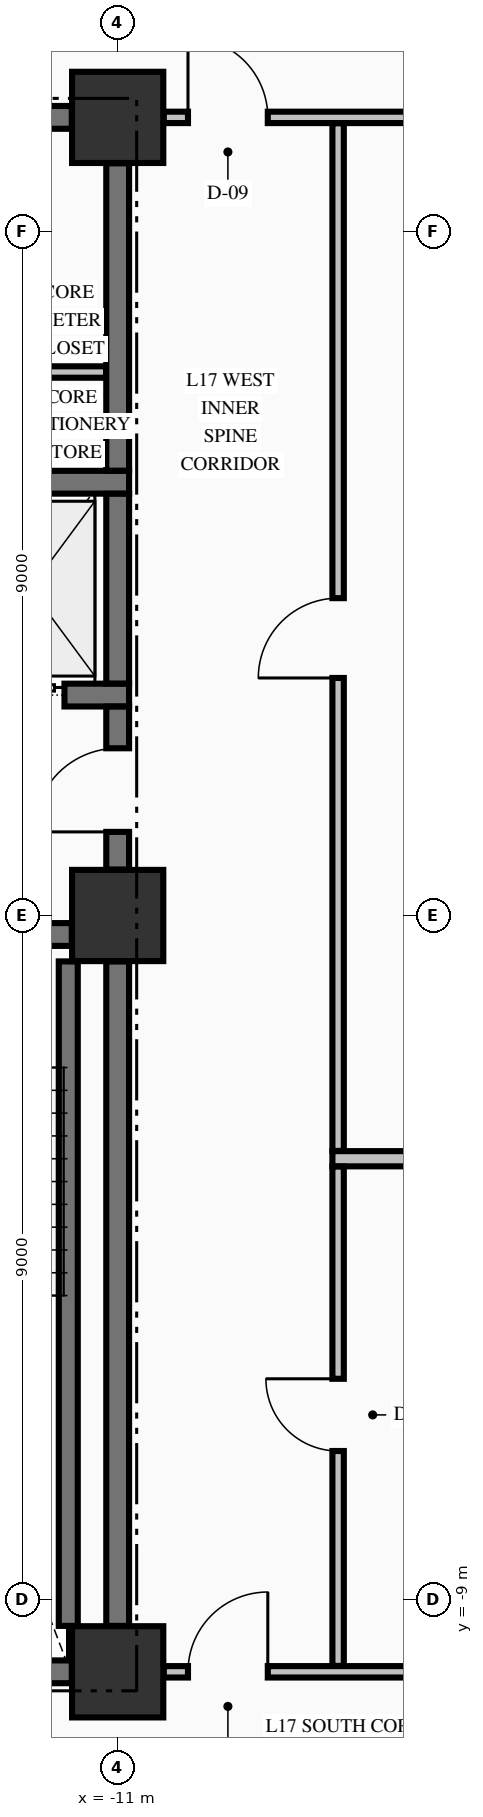
"""IFC4 building model, lengths in metres.
Left out: names, types, materials, properties, quantities, classifications, styles, units other than length and angle.
Written with IfcOpenShell. Run it as: python <this file> out.ifc"""

import sys

from ifc_helpers import new_model, si_unit, direction, frame, frame_2d, origin, origin_2d, place, context, subcontext, project, spatial, rectangle, extrude, element, fill, save


model = new_model("IFC4")
c1 = context("Model", 3, precision=1e-05, world=origin(), true_north=direction((0.0, 1.0)))
c2 = subcontext(c1, "Body", "Model", "MODEL_VIEW")
j1 = project(units=[si_unit("LENGTHUNIT", "METRE"), si_unit("PLANEANGLEUNIT", "RADIAN")], contexts=[c1])
p1 = place(None, origin())
s1 = spatial("IfcSite", under=j1, at=p1, CompositionType="ELEMENT")
p2 = place(p1, origin())
s2 = spatial("IfcBuilding", under=s1, at=p2, CompositionType="ELEMENT")
p3 = place(p2, frame((0.0, 0.0, 71.47)))
s3 = spatial("IfcBuildingStorey", under=s2, at=p3, CompositionType="ELEMENT", Elevation=71.47)
for number, where, z_axis, x_axis in (
    (1, (-11.0, -9.95, -0.325), (0.0, 0.0, 1.0), (1.0, 0.0, 0.0)),
    (2, (-11.0, 0.0, -0.325), (0.0, 0.0, 1.0), (1.0, 0.0, 0.0)),
    (3, (-11.0, 10.5, -0.325), (0.0, 0.0, 1.0), (1.0, 0.0, 0.0)),
):
    element("IfcColumn", number, at=place(p3, frame(where, z_axis=z_axis, x_axis=x_axis)), inside=s3, PredefinedType="COLUMN", context=c2, shape_type="SweptSolid", body=[
        extrude(rectangle(XDim=1.2, YDim=1.2, at=origin_2d()), origin(), (0.0, 0.0, 1.0), 3.645),
    ])
p4 = place(p3, frame((-14.7, -9.95, 0.0), z_axis=(0.0, 0.0, 1.0), x_axis=(1.0, 0.0, 0.0)))
e4 = element("IfcWall", 4, at=p4, inside=s3, PredefinedType="SHEAR", context=c2, shape_type="SweptSolid", body=[
    extrude(rectangle(XDim=3.096, YDim=0.3, at=frame_2d((1.548, 0.0))), origin(), (0.0, 0.0, 1.0), 3.32),
])
p5 = place(p3, frame((-19.396, -0.25, 0.0), z_axis=(0.0, 0.0, 1.0), x_axis=(1.0, 0.0, 0.0)))
e5 = element("IfcWall", 5, at=p5, inside=s3, PredefinedType="SHEAR", context=c2, shape_type="SweptSolid", body=[
    extrude(rectangle(XDim=7.792, YDim=0.3, at=frame_2d((3.896, 0.0))), origin(), (0.0, 0.0, 1.0), 3.32),
])
p6 = place(p5, frame((5.696, 0.0, 0.0)))
e6 = element("IfcOpeningElement", 6, at=p6, cuts=e5, PredefinedType="OPENING", context=c2, shape_type="SweptSolid", body=[
    extrude(rectangle(XDim=1.1, YDim=2.15, at=frame_2d((0.55, 1.075))), frame((0.0, 0.16, 0.0), z_axis=(0.0, -1.0, 0.0), x_axis=(1.0, 0.0, 0.0)), (0.0, 0.0, 1.0), 0.32),
])
p7 = place(p3, frame((-14.875, 2.9, 0.0), z_axis=(0.0, 0.0, 1.0), x_axis=(1.0, 0.0, 0.0)))
e7 = element("IfcWall", 7, at=p7, inside=s3, PredefinedType="SHEAR", context=c2, shape_type="SweptSolid", body=[
    extrude(rectangle(XDim=4.025, YDim=0.3, at=frame_2d((2.012, 0.0))), origin(), (0.0, 0.0, 1.0), 3.32),
])
p8 = place(p7, frame((2.075, 0.0, 0.0)))
e8 = element("IfcOpeningElement", 8, at=p8, cuts=e7, PredefinedType="OPENING", context=c2, shape_type="SweptSolid", body=[
    extrude(rectangle(XDim=1.1, YDim=2.2, at=frame_2d((0.55, 1.1))), frame((0.0, 0.16, 0.0), z_axis=(0.0, -1.0, 0.0), x_axis=(1.0, 0.0, 0.0)), (0.0, 0.0, 1.0), 0.32),
])
p9 = place(p3, frame((-14.875, 5.7, 0.0), z_axis=(0.0, 0.0, 1.0), x_axis=(1.0, 0.0, 0.0)))
e9 = element("IfcWall", 9, at=p9, inside=s3, PredefinedType="SHEAR", context=c2, shape_type="SweptSolid", body=[
    extrude(rectangle(XDim=4.025, YDim=0.3, at=frame_2d((2.012, 0.0))), origin(), (0.0, 0.0, 1.0), 3.32),
])
p10 = place(p3, frame((-14.7, 10.5, 0.0), z_axis=(0.0, 0.0, 1.0), x_axis=(1.0, 0.0, 0.0)))
e10 = element("IfcWall", 10, at=p10, inside=s3, PredefinedType="SHEAR", context=c2, shape_type="SweptSolid", body=[
    extrude(rectangle(XDim=3.096, YDim=0.3, at=frame_2d((1.548, 0.0))), origin(), (0.0, 0.0, 1.0), 3.32),
])
p11 = place(p10, frame((0.305, 0.0, 0.0)))
e11 = element("IfcOpeningElement", 11, at=p11, cuts=e10, PredefinedType="OPENING", context=c2, shape_type="SweptSolid", body=[
    extrude(rectangle(XDim=0.95, YDim=2.15, at=frame_2d((0.475, 1.075))), frame((0.0, 0.16, 0.0), z_axis=(0.0, -1.0, 0.0), x_axis=(1.0, 0.0, 0.0)), (0.0, 0.0, 1.0), 0.32),
])
p12 = place(p3, frame((-10.394, -9.95, 0.0), z_axis=(0.0, 0.0, 1.0), x_axis=(1.0, 0.0, 0.0)))
e12 = element("IfcWall", 12, at=p12, inside=s3, PredefinedType="PARTITIONING", context=c2, shape_type="SweptSolid", body=[
    extrude(rectangle(XDim=20.788, YDim=0.15, at=frame_2d((10.394, 0.0))), origin(), (0.0, 0.0, 1.0), 3.32),
])
p13 = place(p12, frame((0.319, 0.0, 0.0)))
e13 = element("IfcOpeningElement", 13, at=p13, cuts=e12, PredefinedType="OPENING", context=c2, shape_type="SweptSolid", body=[
    extrude(rectangle(XDim=1.05, YDim=2.15, at=frame_2d((0.525, 1.075))), frame((0.0, 0.085, 0.0), z_axis=(0.0, -1.0, 0.0), x_axis=(1.0, 0.0, 0.0)), (0.0, 0.0, 1.0), 0.17),
])
p14 = place(p12, frame((19.419, 0.0, 0.0)))
e14 = element("IfcOpeningElement", 14, at=p14, cuts=e12, PredefinedType="OPENING", context=c2, shape_type="SweptSolid", body=[
    extrude(rectangle(XDim=1.05, YDim=2.15, at=frame_2d((0.525, 1.075))), frame((0.0, 0.085, 0.0), z_axis=(0.0, -1.0, 0.0), x_axis=(1.0, 0.0, 0.0)), (0.0, 0.0, 1.0), 0.17),
])
p15 = place(p12, frame((11.569, 0.0, 0.0)))
e15 = element("IfcOpeningElement", 15, at=p15, cuts=e12, PredefinedType="OPENING", context=c2, shape_type="SweptSolid", body=[
    extrude(rectangle(XDim=0.95, YDim=2.15, at=frame_2d((0.475, 1.075))), frame((0.0, 0.085, 0.0), z_axis=(0.0, -1.0, 0.0), x_axis=(1.0, 0.0, 0.0)), (0.0, 0.0, 1.0), 0.17),
])
p16 = place(p3, frame((-8.175, -3.2, 0.0), z_axis=(0.0, 0.0, 1.0), x_axis=(1.0, 0.0, 0.0)))
e16 = element("IfcWall", 16, at=p16, inside=s3, PredefinedType="PARTITIONING", context=c2, shape_type="SweptSolid", body=[
    extrude(rectangle(XDim=6.475, YDim=0.2, at=frame_2d((3.238, 0.0))), origin(), (0.0, 0.0, 1.0), 3.32),
])
p17 = place(p3, frame((-13.225, 7.15, 0.0), z_axis=(0.0, 0.0, 1.0), x_axis=(1.0, 0.0, 0.0)))
e17 = element("IfcWall", 17, at=p17, inside=s3, PredefinedType="PARTITIONING", context=c2, shape_type="SweptSolid", body=[
    extrude(rectangle(XDim=2.072, YDim=0.15, at=frame_2d((1.036, 0.0))), origin(), (0.0, 0.0, 1.0), 3.32),
])
p18 = place(p3, frame((-10.394, 10.5, 0.0), z_axis=(0.0, 0.0, 1.0), x_axis=(1.0, 0.0, 0.0)))
e18 = element("IfcWall", 18, at=p18, inside=s3, PredefinedType="PARTITIONING", context=c2, shape_type="SweptSolid", body=[
    extrude(rectangle(XDim=20.788, YDim=0.15, at=frame_2d((10.394, 0.0))), origin(), (0.0, 0.0, 1.0), 3.32),
])
p19 = place(p18, frame((0.319, 0.0, 0.0)))
e19 = element("IfcOpeningElement", 19, at=p19, cuts=e18, PredefinedType="OPENING", context=c2, shape_type="SweptSolid", body=[
    extrude(rectangle(XDim=1.05, YDim=2.15, at=frame_2d((0.525, 1.075))), frame((0.0, 0.085, 0.0), z_axis=(0.0, -1.0, 0.0), x_axis=(1.0, 0.0, 0.0)), (0.0, 0.0, 1.0), 0.17),
])
p20 = place(p18, frame((19.419, 0.0, 0.0)))
e20 = element("IfcOpeningElement", 20, at=p20, cuts=e18, PredefinedType="OPENING", context=c2, shape_type="SweptSolid", body=[
    extrude(rectangle(XDim=1.05, YDim=2.15, at=frame_2d((0.525, 1.075))), frame((0.0, 0.085, 0.0), z_axis=(0.0, -1.0, 0.0), x_axis=(1.0, 0.0, 0.0)), (0.0, 0.0, 1.0), 0.17),
])
p21 = place(p3, frame((-11.65, -9.346, 0.0), z_axis=(0.0, 0.0, 1.0), x_axis=(0.0, 1.0, 0.0)))
e21 = element("IfcWall", 21, at=p21, inside=s3, PredefinedType="SOLIDWALL", context=c2, shape_type="SweptSolid", body=[
    extrude(rectangle(XDim=8.742, YDim=0.25, at=frame_2d((4.371, 0.0))), origin(), (0.0, 0.0, 1.0), 3.32),
])
p22 = place(p3, frame((-11.0, -9.346, 0.0), z_axis=(0.0, 0.0, 1.0), x_axis=(0.0, 1.0, 0.0)))
e22 = element("IfcWall", 22, at=p22, inside=s3, PredefinedType="SHEAR", context=c2, shape_type="SweptSolid", body=[
    extrude(rectangle(XDim=8.742, YDim=0.3, at=frame_2d((4.371, 0.0))), origin(), (0.0, 0.0, 1.0), 3.32),
])
p23 = place(p3, frame((-11.0, 0.604, 0.0), z_axis=(0.0, 0.0, 1.0), x_axis=(0.0, 1.0, 0.0)))
e23 = element("IfcWall", 23, at=p23, inside=s3, PredefinedType="SHEAR", context=c2, shape_type="SweptSolid", body=[
    extrude(rectangle(XDim=2.144, YDim=0.3, at=frame_2d((1.072, 0.0))), origin(), (0.0, 0.0, 1.0), 3.32),
])
p24 = place(p23, frame((0.496, 0.0, 0.0)))
e24 = element("IfcOpeningElement", 24, at=p24, cuts=e23, PredefinedType="OPENING", context=c2, shape_type="SweptSolid", body=[
    extrude(rectangle(XDim=1.1, YDim=2.15, at=frame_2d((0.55, 1.075))), frame((0.0, 0.16, 0.0), z_axis=(0.0, -1.0, 0.0), x_axis=(1.0, 0.0, 0.0)), (0.0, 0.0, 1.0), 0.32),
])
p25 = place(p3, frame((-11.0, 3.052, 0.0), z_axis=(0.0, 0.0, 1.0), x_axis=(0.0, 1.0, 0.0)))
e25 = element("IfcWall", 25, at=p25, inside=s3, PredefinedType="SHEAR", context=c2, shape_type="SweptSolid", body=[
    extrude(rectangle(XDim=2.496, YDim=0.3, at=frame_2d((1.248, 0.0))), origin(), (0.0, 0.0, 1.0), 3.32),
])
p26 = place(p3, frame((-11.0, 5.852, 0.0), z_axis=(0.0, 0.0, 1.0), x_axis=(0.0, 1.0, 0.0)))
e26 = element("IfcWall", 26, at=p26, inside=s3, PredefinedType="SHEAR", context=c2, shape_type="SweptSolid", body=[
    extrude(rectangle(XDim=4.044, YDim=0.3, at=frame_2d((2.022, 0.0))), origin(), (0.0, 0.0, 1.0), 3.32),
])
p27 = place(p3, frame((-8.1, -9.872, 0.0), z_axis=(0.0, 0.0, 1.0), x_axis=(0.0, 1.0, 0.0)))
e27 = element("IfcWall", 27, at=p27, inside=s3, PredefinedType="PARTITIONING", context=c2, shape_type="SweptSolid", body=[
    extrude(rectangle(XDim=6.569, YDim=0.15, at=frame_2d((3.285, 0.0))), origin(), (0.0, 0.0, 1.0), 3.32),
])
p28 = place(p27, frame((2.827, 0.0, 0.0)))
e28 = element("IfcOpeningElement", 28, at=p28, cuts=e27, PredefinedType="OPENING", context=c2, shape_type="SweptSolid", body=[
    extrude(rectangle(XDim=0.95, YDim=2.15, at=frame_2d((0.475, 1.075))), frame((0.0, 0.085, 0.0), z_axis=(0.0, -1.0, 0.0), x_axis=(1.0, 0.0, 0.0)), (0.0, 0.0, 1.0), 0.17),
])
p29 = place(p3, frame((-8.1, -3.097, 0.0), z_axis=(0.0, 0.0, 1.0), x_axis=(0.0, 1.0, 0.0)))
e29 = element("IfcWall", 29, at=p29, inside=s3, PredefinedType="PARTITIONING", context=c2, shape_type="SweptSolid", body=[
    extrude(rectangle(XDim=13.519, YDim=0.15, at=frame_2d((6.76, 0.0))), origin(), (0.0, 0.0, 1.0), 3.32),
])
p30 = place(p29, frame((6.222, 0.0, 0.0)))
e30 = element("IfcOpeningElement", 30, at=p30, cuts=e29, PredefinedType="OPENING", context=c2, shape_type="SweptSolid", body=[
    extrude(rectangle(XDim=1.05, YDim=2.15, at=frame_2d((0.525, 1.075))), frame((0.0, 0.085, 0.0), z_axis=(0.0, -1.0, 0.0), x_axis=(1.0, 0.0, 0.0)), (0.0, 0.0, 1.0), 0.17),
])
p31 = place(p24, origin())
e31 = element("IfcDoor", 31, at=p31, inside=s3, OperationType="SINGLE_SWING_LEFT", PredefinedType="DOOR", context=c2, shape_type="SweptSolid", body=[
    extrude(rectangle(XDim=1.1, YDim=2.15, at=frame_2d((0.55, 1.075))), frame((0.0, 0.025, 0.0), z_axis=(0.0, -1.0, 0.0), x_axis=(1.0, 0.0, 0.0)), (0.0, 0.0, 1.0), 0.05),
])
fill(e24, e31)
p32 = place(p8, origin())
e32 = element("IfcDoor", 32, at=p32, inside=s3, OperationType="SLIDING_TO_LEFT", PredefinedType="DOOR", context=c2, shape_type="SweptSolid", body=[
    extrude(rectangle(XDim=1.1, YDim=2.2, at=frame_2d((0.55, 1.1))), frame((0.0, 0.025, 0.0), z_axis=(0.0, -1.0, 0.0), x_axis=(1.0, 0.0, 0.0)), (0.0, 0.0, 1.0), 0.05),
])
fill(e8, e32)
p33 = place(p19, origin())
e33 = element("IfcDoor", 33, at=p33, inside=s3, OperationType="SINGLE_SWING_LEFT", PredefinedType="DOOR", context=c2, shape_type="SweptSolid", body=[
    extrude(rectangle(XDim=1.05, YDim=2.15, at=frame_2d((0.525, 1.075))), frame((0.0, 0.025, 0.0), z_axis=(0.0, -1.0, 0.0), x_axis=(1.0, 0.0, 0.0)), (0.0, 0.0, 1.0), 0.05),
])
fill(e19, e33)
p34 = place(p13, origin())
e34 = element("IfcDoor", 34, at=p34, inside=s3, OperationType="SINGLE_SWING_RIGHT", PredefinedType="DOOR", context=c2, shape_type="SweptSolid", body=[
    extrude(rectangle(XDim=1.05, YDim=2.15, at=frame_2d((0.525, 1.075))), frame((0.0, 0.025, 0.0), z_axis=(0.0, -1.0, 0.0), x_axis=(1.0, 0.0, 0.0)), (0.0, 0.0, 1.0), 0.05),
])
fill(e13, e34)
p35 = place(p30, origin())
e35 = element("IfcDoor", 35, at=p35, inside=s3, OperationType="SINGLE_SWING_LEFT", PredefinedType="DOOR", context=c2, shape_type="SweptSolid", body=[
    extrude(rectangle(XDim=1.05, YDim=2.15, at=frame_2d((0.525, 1.075))), frame((0.0, 0.025, 0.0), z_axis=(0.0, -1.0, 0.0), x_axis=(1.0, 0.0, 0.0)), (0.0, 0.0, 1.0), 0.05),
])
fill(e30, e35)
p36 = place(p28, origin())
e36 = element("IfcDoor", 36, at=p36, inside=s3, OperationType="SINGLE_SWING_RIGHT", PredefinedType="DOOR", context=c2, shape_type="SweptSolid", body=[
    extrude(rectangle(XDim=0.95, YDim=2.15, at=frame_2d((0.475, 1.075))), frame((0.0, 0.025, 0.0), z_axis=(0.0, -1.0, 0.0), x_axis=(1.0, 0.0, 0.0)), (0.0, 0.0, 1.0), 0.05),
])
fill(e28, e36)
save(model, sys.argv[1])
